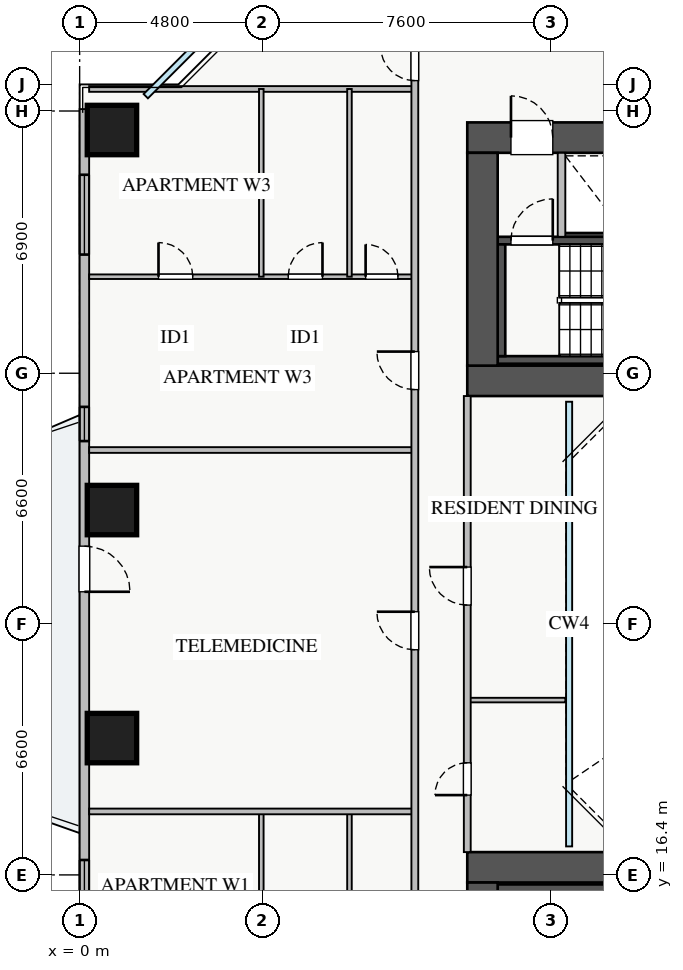
"""IFC4 building model, lengths in metres.
Left out: names, types, materials, properties, quantities, classifications, styles, units other than length and angle.
Written with IfcOpenShell. Run it as: python <this file> out.ifc"""

import sys

from ifc_helpers import new_model, si_unit, direction, frame, frame_2d, origin, origin_2d, place, context, subcontext, project, spatial, rectangle, extrude, source, transform, mapped, element, fill, save


model = new_model("IFC4")
c1 = context("Model", 3, precision=1e-05, world=origin(), true_north=direction((0.0, 1.0)))
c2 = subcontext(c1, "Body", "Model", "MODEL_VIEW")
j1 = project(units=[si_unit("LENGTHUNIT", "METRE"), si_unit("PLANEANGLEUNIT", "RADIAN")], contexts=[c1])
p1 = place(None, origin())
s1 = spatial("IfcSite", under=j1, at=p1, CompositionType="ELEMENT")
p2 = place(p1, origin())
s2 = spatial("IfcBuilding", under=s1, at=p2, CompositionType="ELEMENT")
p3 = place(p2, frame((0.0, 0.0, 56.75)))
s3 = spatial("IfcBuildingStorey", under=s2, at=p3, CompositionType="ELEMENT", Elevation=56.75)
p4 = place(p3, frame((12.68, 33.2, 0.0), z_axis=(0.0, 0.0, 1.0), x_axis=(1.0, 0.0, 0.0)))
e1 = element("IfcWall", 1, at=p4, inside=s3, PredefinedType="SHEAR", context=c2, shape_type="SweptSolid", body=[
    extrude(rectangle(XDim=1.94, YDim=0.18, at=frame_2d((0.97, 0.0))), origin(), (0.0, 0.0, 1.0), 3.07),
])
p5 = place(p3, frame((11.0, 29.95, 0.0), z_axis=(0.0, 0.0, 1.0), x_axis=(1.0, 0.0, 0.0)))
e2 = element("IfcWall", 2, at=p5, inside=s3, PredefinedType="SHEAR", context=c2, shape_type="SweptSolid", body=[
    extrude(rectangle(XDim=7.15, YDim=0.2, at=frame_2d((3.575, 0.0))), origin(), (0.0, 0.0, 1.0), 3.25),
])
p6 = place(p3, frame((11.0, 33.09, 0.0), z_axis=(0.0, 0.0, 1.0), x_axis=(1.0, 0.0, 0.0)))
e3 = element("IfcWall", 3, at=p6, inside=s3, PredefinedType="SHEAR", context=c2, shape_type="SweptSolid", body=[
    extrude(rectangle(XDim=7.15, YDim=0.2, at=frame_2d((3.575, 0.0))), origin(), (0.0, 0.0, 1.0), 3.25),
])
p7 = place(p6, frame((0.35, 0.0, 0.0)))
e4 = element("IfcOpeningElement", 4, at=p7, cuts=e3, PredefinedType="OPENING", context=c2, shape_type="SweptSolid", body=[
    extrude(rectangle(XDim=1.1, YDim=2.05, at=frame_2d((0.55, 1.025))), frame((0.0, 0.11, 0.0), z_axis=(0.0, -1.0, 0.0), x_axis=(1.0, 0.0, 0.0)), (0.0, 0.0, 1.0), 0.22),
])
p8 = place(p3, frame((11.1, 30.05, 0.0), z_axis=(0.0, 0.0, 1.0), x_axis=(0.0, 1.0, 0.0)))
e5 = element("IfcWall", 5, at=p8, inside=s3, PredefinedType="SHEAR", context=c2, shape_type="SweptSolid", body=[
    extrude(rectangle(XDim=2.94, YDim=0.2, at=frame_2d((1.47, 0.0))), origin(), (0.0, 0.0, 1.0), 3.25),
])
p9 = place(p3, frame((11.0, 16.05, 0.0), z_axis=(0.0, 0.0, 1.0), x_axis=(1.0, 0.0, 0.0)))
e6 = element("IfcWall", 6, at=p9, inside=s3, PredefinedType="SHEAR", context=c2, shape_type="SweptSolid", body=[
    extrude(rectangle(XDim=7.15, YDim=0.2, at=frame_2d((3.575, 0.0))), origin(), (0.0, 0.0, 1.0), 3.25),
])
p10 = place(p3, frame((10.2, 29.4, 0.0), z_axis=(0.0, 0.0, 1.0), x_axis=(1.0, 0.0, 0.0)))
e7 = element("IfcWall", 7, at=p10, inside=s3, PredefinedType="SHEAR", context=c2, shape_type="SweptSolid", body=[
    extrude(rectangle(XDim=17.6, YDim=0.8, at=frame_2d((8.8, 0.0))), origin(), (0.0, 0.0, 1.0), 3.25),
])
p11 = place(p3, frame((10.2, 35.8, 0.0), z_axis=(0.0, 0.0, 1.0), x_axis=(1.0, 0.0, 0.0)))
e8 = element("IfcWall", 8, at=p11, inside=s3, PredefinedType="SHEAR", context=c2, shape_type="SweptSolid", body=[
    extrude(rectangle(XDim=17.6, YDim=0.8, at=frame_2d((8.8, 0.0))), origin(), (0.0, 0.0, 1.0), 3.25),
])
p12 = place(p11, frame((1.15, 0.0, 0.0)))
e9 = element("IfcOpeningElement", 9, at=p12, cuts=e8, PredefinedType="OPENING", context=c2, shape_type="SweptSolid", body=[
    extrude(rectangle(XDim=1.1, YDim=2.05, at=frame_2d((0.55, 1.025))), frame((0.0, 0.41, 0.0), z_axis=(0.0, -1.0, 0.0), x_axis=(1.0, 0.0, 0.0)), (0.0, 0.0, 1.0), 0.82),
])
p13 = place(p11, frame((8.3, 0.0, 0.0)))
e10 = element("IfcOpeningElement", 10, at=p13, cuts=e8, PredefinedType="OPENING", context=c2, shape_type="SweptSolid", body=[
    extrude(rectangle(XDim=1.1, YDim=2.05, at=frame_2d((0.55, 1.025))), frame((0.0, 0.41, 0.0), z_axis=(0.0, -1.0, 0.0), x_axis=(1.0, 0.0, 0.0)), (0.0, 0.0, 1.0), 0.82),
])
p14 = place(p11, frame((10.05, 0.0, 0.0)))
e11 = element("IfcOpeningElement", 11, at=p14, cuts=e8, PredefinedType="OPENING", context=c2, shape_type="SweptSolid", body=[
    extrude(rectangle(XDim=1.1, YDim=2.05, at=frame_2d((0.55, 1.025))), frame((0.0, 0.41, 0.0), z_axis=(0.0, -1.0, 0.0), x_axis=(1.0, 0.0, 0.0)), (0.0, 0.0, 1.0), 0.82),
])
p15 = place(p11, frame((14.74, 0.0, 0.0)))
e12 = element("IfcOpeningElement", 12, at=p15, cuts=e8, PredefinedType="OPENING", context=c2, shape_type="SweptSolid", body=[
    extrude(rectangle(XDim=1.0, YDim=2.05, at=frame_2d((0.5, 1.025))), frame((0.0, 0.41, 0.0), z_axis=(0.0, -1.0, 0.0), x_axis=(1.0, 0.0, 0.0)), (0.0, 0.0, 1.0), 0.82),
])
p16 = place(p11, frame((12.585, 0.0, 0.0)))
e13 = element("IfcOpeningElement", 13, at=p16, cuts=e8, PredefinedType="OPENING", context=c2, shape_type="SweptSolid", body=[
    extrude(rectangle(XDim=1.0, YDim=2.05, at=frame_2d((0.5, 1.025))), frame((0.0, 0.41, 0.0), z_axis=(0.0, -1.0, 0.0), x_axis=(1.0, 0.0, 0.0)), (0.0, 0.0, 1.0), 0.82),
])
p17 = place(p3, frame((10.6, 29.8, 0.0), z_axis=(0.0, 0.0, 1.0), x_axis=(0.0, 1.0, 0.0)))
e14 = element("IfcWall", 14, at=p17, inside=s3, PredefinedType="SHEAR", context=c2, shape_type="SweptSolid", body=[
    extrude(rectangle(XDim=5.6, YDim=0.8, at=frame_2d((2.8, 0.0))), origin(), (0.0, 0.0, 1.0), 3.25),
])
p18 = place(p3, frame((10.2, 16.6, 0.0), z_axis=(0.0, 0.0, 1.0), x_axis=(1.0, 0.0, 0.0)))
e15 = element("IfcWall", 15, at=p18, inside=s3, PredefinedType="SHEAR", context=c2, shape_type="SweptSolid", body=[
    extrude(rectangle(XDim=17.6, YDim=0.8, at=frame_2d((8.8, 0.0))), origin(), (0.0, 0.0, 1.0), 3.25),
])
p19 = place(p3, frame((10.6, 10.6, 0.0), z_axis=(0.0, 0.0, 1.0), x_axis=(0.0, 1.0, 0.0)))
e16 = element("IfcWall", 16, at=p19, inside=s3, PredefinedType="SHEAR", context=c2, shape_type="SweptSolid", body=[
    extrude(rectangle(XDim=5.6, YDim=0.8, at=frame_2d((2.8, 0.0))), origin(), (0.0, 0.0, 1.0), 3.25),
])
m1 = source(origin(), c2, "Body", "SweptSolid", [
    extrude(rectangle(XDim=1.3, YDim=1.3, at=origin_2d()), origin(), (0.0, 0.0, 1.0), 3.25),
])
for number, where, z_axis, x_axis in (
    (17, (0.85, 36.0, 0.0), (0.0, 0.0, 1.0), (1.0, 0.0, 0.0)),
    (18, (0.85, 26.0, 0.0), (0.0, 0.0, 1.0), (1.0, 0.0, 0.0)),
    (19, (0.85, 20.0, 0.0), (0.0, 0.0, 1.0), (1.0, 0.0, 0.0)),
):
    element("IfcColumn", number, at=place(p3, frame(where, z_axis=z_axis, x_axis=x_axis)), inside=s3, PredefinedType="COLUMN", context=c2, shape_type="MappedRepresentation", body=[
        mapped(m1, transform((0.0, 0.0, 0.0), x_axis=(1.0, 0.0, 0.0), y_axis=(0.0, 1.0, 0.0), z_axis=(0.0, 0.0, 1.0), scale=1.0)),
    ])
p20 = place(p3, frame((0.125, 9.45, 0.0), z_axis=(0.0, 0.0, 1.0), x_axis=(0.0, 1.0, 0.0)))
e20 = element("IfcWall", 20, at=p20, inside=s3, PredefinedType="STANDARD", context=c2, shape_type="SweptSolid", body=[
    extrude(rectangle(XDim=27.1, YDim=0.25, at=frame_2d((13.55, 0.0))), origin(), (0.0, 0.0, 1.0), 2.61),
])
p21 = place(p20, frame((14.4, 0.0, 0.0)))
e21 = element("IfcOpeningElement", 21, at=p21, cuts=e20, PredefinedType="OPENING", context=c2, shape_type="SweptSolid", body=[
    extrude(rectangle(XDim=1.2, YDim=2.1, at=frame_2d((0.6, 1.05))), frame((0.0, 0.135, 0.0), z_axis=(0.0, -1.0, 0.0), x_axis=(1.0, 0.0, 0.0)), (0.0, 0.0, 1.0), 0.27),
])
p22 = place(p20, frame((1.512, 0.0, 0.9)))
e22 = element("IfcOpeningElement", 22, at=p22, cuts=e20, PredefinedType="OPENING", context=c2, shape_type="SweptSolid", body=[
    extrude(rectangle(XDim=1.8, YDim=1.5, at=frame_2d((0.9, 0.75))), frame((0.0, 0.135, 0.0), z_axis=(0.0, -1.0, 0.0), x_axis=(1.0, 0.0, 0.0)), (0.0, 0.0, 1.0), 0.27),
])
p23 = place(p20, frame((23.272, 0.0, 0.9)))
e23 = element("IfcOpeningElement", 23, at=p23, cuts=e20, PredefinedType="OPENING", context=c2, shape_type="SweptSolid", body=[
    extrude(rectangle(XDim=2.1, YDim=1.5, at=frame_2d((1.05, 0.75))), frame((0.0, 0.135, 0.0), z_axis=(0.0, -1.0, 0.0), x_axis=(1.0, 0.0, 0.0)), (0.0, 0.0, 1.0), 0.27),
])
p24 = place(p20, frame((4.942, 0.0, 0.9)))
e24 = element("IfcOpeningElement", 24, at=p24, cuts=e20, PredefinedType="OPENING", context=c2, shape_type="SweptSolid", body=[
    extrude(rectangle(XDim=2.4, YDim=1.5, at=frame_2d((1.2, 0.75))), frame((0.0, 0.135, 0.0), z_axis=(0.0, -1.0, 0.0), x_axis=(1.0, 0.0, 0.0)), (0.0, 0.0, 1.0), 0.27),
])
p25 = place(p20, frame((18.365, 0.0, 0.9)))
e25 = element("IfcOpeningElement", 25, at=p25, cuts=e20, PredefinedType="OPENING", context=c2, shape_type="SweptSolid", body=[
    extrude(rectangle(XDim=0.9, YDim=1.2, at=frame_2d((0.45, 0.6))), frame((0.0, 0.135, 0.0), z_axis=(0.0, -1.0, 0.0), x_axis=(1.0, 0.0, 0.0)), (0.0, 0.0, 1.0), 0.27),
])
p26 = place(p3, frame((12.68, 33.19, 0.0), z_axis=(0.0, 0.0, 1.0), x_axis=(0.0, 1.0, 0.0)))
e26 = element("IfcWall", 26, at=p26, inside=s3, PredefinedType="PARTITIONING", context=c2, shape_type="SweptSolid", body=[
    extrude(rectangle(XDim=2.21, YDim=0.2, at=frame_2d((1.105, 0.0))), origin(), (0.0, 0.0, 1.0), 3.07),
])
p27 = place(p3, frame((0.25, 37.08, 0.0), z_axis=(0.0, 0.0, 1.0), x_axis=(1.0, 0.0, 0.0)))
e27 = element("IfcWall", 27, at=p27, inside=s3, PredefinedType="PARTITIONING", context=c2, shape_type="SweptSolid", body=[
    extrude(rectangle(XDim=8.57, YDim=0.15, at=frame_2d((4.285, 0.0))), origin(), (0.0, 0.0, 1.0), 3.07),
])
for number, where, z_axis, x_axis in (
    (28, (4.78, 13.13, 0.0), (0.0, 0.0, 1.0), (0.0, 1.0, 0.0)),
    (29, (7.1, 13.13, 0.0), (0.0, 0.0, 1.0), (0.0, 1.0, 0.0)),
):
    element("IfcWall", number, at=place(p3, frame(where, z_axis=z_axis, x_axis=x_axis)), inside=s3, PredefinedType="PLUMBINGWALL", context=c2, shape_type="SweptSolid", body=[
        extrude(rectangle(XDim=4.94, YDim=0.12, at=frame_2d((2.47, 0.0))), origin(), (0.0, 0.0, 1.0), 3.07),
    ])
p28 = place(p3, frame((0.25, 18.07, 0.0), z_axis=(0.0, 0.0, 1.0), x_axis=(1.0, 0.0, 0.0)))
e30 = element("IfcWall", 30, at=p28, inside=s3, PredefinedType="PARTITIONING", context=c2, shape_type="SweptSolid", body=[
    extrude(rectangle(XDim=8.57, YDim=0.15, at=frame_2d((4.285, 0.0))), origin(), (0.0, 0.0, 1.0), 2.715),
])
p29 = place(p3, frame((0.25, 32.14, 0.0), z_axis=(0.0, 0.0, 1.0), x_axis=(1.0, 0.0, 0.0)))
e31 = element("IfcWall", 31, at=p29, inside=s3, PredefinedType="PLUMBINGWALL", context=c2, shape_type="SweptSolid", body=[
    extrude(rectangle(XDim=8.57, YDim=0.12, at=frame_2d((4.285, 0.0))), origin(), (0.0, 0.0, 1.0), 3.07),
])
p30 = place(p29, frame((1.825, 0.0, 0.0)))
e32 = element("IfcOpeningElement", 32, at=p30, cuts=e31, PredefinedType="OPENING", context=c2, shape_type="SweptSolid", body=[
    extrude(rectangle(XDim=0.9, YDim=2.05, at=frame_2d((0.45, 1.025))), frame((0.0, 0.07, 0.0), z_axis=(0.0, -1.0, 0.0), x_axis=(1.0, 0.0, 0.0)), (0.0, 0.0, 1.0), 0.14),
])
p31 = place(p29, frame((5.24, 0.0, 0.0)))
e33 = element("IfcOpeningElement", 33, at=p31, cuts=e31, PredefinedType="OPENING", context=c2, shape_type="SweptSolid", body=[
    extrude(rectangle(XDim=0.9, YDim=2.05, at=frame_2d((0.45, 1.025))), frame((0.0, 0.07, 0.0), z_axis=(0.0, -1.0, 0.0), x_axis=(1.0, 0.0, 0.0)), (0.0, 0.0, 1.0), 0.14),
])
p32 = place(p29, frame((7.275, 0.0, 0.0)))
e34 = element("IfcOpeningElement", 34, at=p32, cuts=e31, PredefinedType="OPENING", context=c2, shape_type="SweptSolid", body=[
    extrude(rectangle(XDim=0.85, YDim=2.05, at=frame_2d((0.425, 1.025))), frame((0.0, 0.07, 0.0), z_axis=(0.0, -1.0, 0.0), x_axis=(1.0, 0.0, 0.0)), (0.0, 0.0, 1.0), 0.14),
])
for number, where, z_axis, x_axis in (
    (35, (4.78, 32.14, 0.0), (0.0, 0.0, 1.0), (0.0, 1.0, 0.0)),
    (36, (7.1, 32.14, 0.0), (0.0, 0.0, 1.0), (0.0, 1.0, 0.0)),
):
    element("IfcWall", number, at=place(p3, frame(where, z_axis=z_axis, x_axis=x_axis)), inside=s3, PredefinedType="PLUMBINGWALL", context=c2, shape_type="SweptSolid", body=[
        extrude(rectangle(XDim=4.94, YDim=0.12, at=frame_2d((2.47, 0.0))), origin(), (0.0, 0.0, 1.0), 3.07),
    ])
p33 = place(p3, frame((0.25, 27.58, 0.0), z_axis=(0.0, 0.0, 1.0), x_axis=(1.0, 0.0, 0.0)))
e37 = element("IfcWall", 37, at=p33, inside=s3, PredefinedType="PARTITIONING", context=c2, shape_type="SweptSolid", body=[
    extrude(rectangle(XDim=8.57, YDim=0.15, at=frame_2d((4.285, 0.0))), origin(), (0.0, 0.0, 1.0), 2.715),
])
p34 = place(p3, frame((8.82, 7.21, 0.0), z_axis=(0.0, 0.0, 1.0), x_axis=(0.0, 1.0, 0.0)))
e38 = element("IfcWall", 38, at=p34, inside=s3, PredefinedType="PARTITIONING", context=c2, shape_type="SweptSolid", body=[
    extrude(rectangle(XDim=31.23, YDim=0.18, at=frame_2d((15.615, 0.0))), origin(), (0.0, 0.0, 1.0), 3.07),
])
p35 = place(p34, frame((30.09, 0.0, 0.0)))
e39 = element("IfcOpeningElement", 39, at=p35, cuts=e38, PredefinedType="OPENING", context=c2, shape_type="SweptSolid", body=[
    extrude(rectangle(XDim=0.9, YDim=2.05, at=frame_2d((0.45, 1.025))), frame((0.0, 0.1, 0.0), z_axis=(0.0, -1.0, 0.0), x_axis=(1.0, 0.0, 0.0)), (0.0, 0.0, 1.0), 0.2),
])
p36 = place(p34, frame((0.24, 0.0, 0.0)))
e40 = element("IfcOpeningElement", 40, at=p36, cuts=e38, PredefinedType="OPENING", context=c2, shape_type="SweptSolid", body=[
    extrude(rectangle(XDim=0.9, YDim=2.05, at=frame_2d((0.45, 1.025))), frame((0.0, 0.1, 0.0), z_axis=(0.0, -1.0, 0.0), x_axis=(1.0, 0.0, 0.0)), (0.0, 0.0, 1.0), 0.2),
])
p37 = place(p34, frame((2.95, 0.0, 0.0)))
e41 = element("IfcOpeningElement", 41, at=p37, cuts=e38, PredefinedType="OPENING", context=c2, shape_type="SweptSolid", body=[
    extrude(rectangle(XDim=1.0, YDim=2.05, at=frame_2d((0.5, 1.025))), frame((0.0, 0.1, 0.0), z_axis=(0.0, -1.0, 0.0), x_axis=(1.0, 0.0, 0.0)), (0.0, 0.0, 1.0), 0.2),
])
p38 = place(p34, frame((15.115, 0.0, 0.0)))
e42 = element("IfcOpeningElement", 42, at=p38, cuts=e38, PredefinedType="OPENING", context=c2, shape_type="SweptSolid", body=[
    extrude(rectangle(XDim=1.0, YDim=2.05, at=frame_2d((0.5, 1.025))), frame((0.0, 0.1, 0.0), z_axis=(0.0, -1.0, 0.0), x_axis=(1.0, 0.0, 0.0)), (0.0, 0.0, 1.0), 0.2),
])
p39 = place(p34, frame((21.96, 0.0, 0.0)))
e43 = element("IfcOpeningElement", 43, at=p39, cuts=e38, PredefinedType="OPENING", context=c2, shape_type="SweptSolid", body=[
    extrude(rectangle(XDim=1.0, YDim=2.05, at=frame_2d((0.5, 1.025))), frame((0.0, 0.1, 0.0), z_axis=(0.0, -1.0, 0.0), x_axis=(1.0, 0.0, 0.0)), (0.0, 0.0, 1.0), 0.2),
])
p40 = place(p3, frame((10.2, 21.0, 0.0), z_axis=(0.0, 0.0, 1.0), x_axis=(1.0, 0.0, 0.0)))
e44 = element("IfcWall", 44, at=p40, inside=s3, PredefinedType="PLUMBINGWALL", context=c2, shape_type="SweptSolid", body=[
    extrude(rectangle(XDim=2.58, YDim=0.12, at=frame_2d((1.29, 0.0))), origin(), (0.0, 0.0, 1.0), 3.07),
])
p41 = place(p3, frame((10.2, 17.0, 0.0), z_axis=(0.0, 0.0, 1.0), x_axis=(0.0, 1.0, 0.0)))
e45 = element("IfcWall", 45, at=p41, inside=s3, PredefinedType="PARTITIONING", context=c2, shape_type="SweptSolid", body=[
    extrude(rectangle(XDim=12.0, YDim=0.18, at=frame_2d((6.0, 0.0))), origin(), (0.0, 0.0, 1.0), 3.07),
])
p42 = place(p41, frame((1.5, 0.0, 0.0)))
e46 = element("IfcOpeningElement", 46, at=p42, cuts=e45, PredefinedType="OPENING", context=c2, shape_type="SweptSolid", body=[
    extrude(rectangle(XDim=0.85, YDim=2.05, at=frame_2d((0.425, 1.025))), frame((0.0, 0.1, 0.0), z_axis=(0.0, -1.0, 0.0), x_axis=(1.0, 0.0, 0.0)), (0.0, 0.0, 1.0), 0.2),
])
p43 = place(p41, frame((6.5, 0.0, 0.0)))
e47 = element("IfcOpeningElement", 47, at=p43, cuts=e45, PredefinedType="OPENING", context=c2, shape_type="SweptSolid", body=[
    extrude(rectangle(XDim=1.0, YDim=2.05, at=frame_2d((0.5, 1.025))), frame((0.0, 0.1, 0.0), z_axis=(0.0, -1.0, 0.0), x_axis=(1.0, 0.0, 0.0)), (0.0, 0.0, 1.0), 0.2),
])
m2 = source(origin(), c2, "Body", "SweptSolid", [
    extrude(rectangle(XDim=1.2, YDim=2.1, at=frame_2d((0.6, 1.05))), frame((0.0, 0.025, 0.0), z_axis=(0.0, -1.0, 0.0), x_axis=(1.0, 0.0, 0.0)), (0.0, 0.0, 1.0), 0.05),
])
p44 = place(p21, frame((1.2, 0.0, 0.0), z_axis=(0.0, 0.0, 1.0), x_axis=(-1.0, 0.0, 0.0)))
e48 = element("IfcDoor", 48, at=p44, inside=s3, OperationType="SINGLE_SWING_LEFT", PredefinedType="DOOR", context=c2, shape_type="MappedRepresentation", body=[
    mapped(m2, transform((0.0, 0.0, 0.0), x_axis=(1.0, 0.0, 0.0), y_axis=(0.0, 1.0, 0.0), z_axis=(0.0, 0.0, 1.0), scale=1.0)),
])
fill(e21, e48)
m3 = source(origin(), c2, "Body", "SweptSolid", [
    extrude(rectangle(XDim=2.1, YDim=1.5, at=frame_2d((1.05, 0.75))), frame((0.0, 0.03, 0.0), z_axis=(0.0, -1.0, 0.0), x_axis=(1.0, 0.0, 0.0)), (0.0, 0.0, 1.0), 0.06),
])
p45 = place(p23, origin())
e49 = element("IfcWindow", 49, at=p45, inside=s3, PartitioningType="TRIPLE_PANEL_VERTICAL", PredefinedType="WINDOW", context=c2, shape_type="MappedRepresentation", body=[
    mapped(m3, transform((0.0, 0.0, 0.0), x_axis=(1.0, 0.0, 0.0), y_axis=(0.0, 1.0, 0.0), z_axis=(0.0, 0.0, 1.0), scale=1.0)),
])
fill(e23, e49)
m4 = source(origin(), c2, "Body", "SweptSolid", [
    extrude(rectangle(XDim=1.1, YDim=2.05, at=frame_2d((0.55, 1.025))), frame((0.0, 0.025, 0.0), z_axis=(0.0, -1.0, 0.0), x_axis=(1.0, 0.0, 0.0)), (0.0, 0.0, 1.0), 0.05),
])
p46 = place(p12, origin())
e50 = element("IfcDoor", 50, at=p46, inside=s3, OperationType="SINGLE_SWING_LEFT", PredefinedType="DOOR", context=c2, shape_type="MappedRepresentation", body=[
    mapped(m4, transform((0.0, 0.0, 0.0), x_axis=(1.0, 0.0, 0.0), y_axis=(0.0, 1.0, 0.0), z_axis=(0.0, 0.0, 1.0), scale=1.0)),
])
fill(e9, e50)
p47 = place(p7, origin())
e51 = element("IfcDoor", 51, at=p47, inside=s3, OperationType="SINGLE_SWING_RIGHT", PredefinedType="DOOR", context=c2, shape_type="MappedRepresentation", body=[
    mapped(m4, transform((0.0, 0.0, 0.0), x_axis=(1.0, 0.0, 0.0), y_axis=(0.0, 1.0, 0.0), z_axis=(0.0, 0.0, 1.0), scale=1.0)),
])
fill(e4, e51)
m5 = source(origin(), c2, "Body", "SweptSolid", [
    extrude(rectangle(XDim=0.9, YDim=2.05, at=frame_2d((0.45, 1.025))), frame((0.0, 0.025, 0.0), z_axis=(0.0, -1.0, 0.0), x_axis=(1.0, 0.0, 0.0)), (0.0, 0.0, 1.0), 0.05),
])
p48 = place(p30, origin())
e52 = element("IfcDoor", 52, at=p48, inside=s3, OperationType="SINGLE_SWING_LEFT", PredefinedType="DOOR", context=c2, shape_type="MappedRepresentation", body=[
    mapped(m5, transform((0.0, 0.0, 0.0), x_axis=(1.0, 0.0, 0.0), y_axis=(0.0, 1.0, 0.0), z_axis=(0.0, 0.0, 1.0), scale=1.0)),
])
fill(e32, e52)
p49 = place(p31, origin())
e53 = element("IfcDoor", 53, at=p49, inside=s3, OperationType="SINGLE_SWING_RIGHT", PredefinedType="DOOR", context=c2, shape_type="MappedRepresentation", body=[
    mapped(m5, transform((0.0, 0.0, 0.0), x_axis=(1.0, 0.0, 0.0), y_axis=(0.0, 1.0, 0.0), z_axis=(0.0, 0.0, 1.0), scale=1.0)),
])
fill(e33, e53)
m6 = source(origin(), c2, "Body", "SweptSolid", [
    extrude(rectangle(XDim=0.85, YDim=2.05, at=frame_2d((0.425, 1.025))), frame((0.0, 0.025, 0.0), z_axis=(0.0, -1.0, 0.0), x_axis=(1.0, 0.0, 0.0)), (0.0, 0.0, 1.0), 0.05),
])
p50 = place(p32, origin())
e54 = element("IfcDoor", 54, at=p50, inside=s3, OperationType="SINGLE_SWING_LEFT", PredefinedType="DOOR", context=c2, shape_type="MappedRepresentation", body=[
    mapped(m6, transform((0.0, 0.0, 0.0), x_axis=(1.0, 0.0, 0.0), y_axis=(0.0, 1.0, 0.0), z_axis=(0.0, 0.0, 1.0), scale=1.0)),
])
fill(e34, e54)
p51 = place(p35, origin())
e55 = element("IfcDoor", 55, at=p51, inside=s3, OperationType="SINGLE_SWING_RIGHT", PredefinedType="DOOR", context=c2, shape_type="MappedRepresentation", body=[
    mapped(m5, transform((0.0, 0.0, 0.0), x_axis=(1.0, 0.0, 0.0), y_axis=(0.0, 1.0, 0.0), z_axis=(0.0, 0.0, 1.0), scale=1.0)),
])
fill(e39, e55)
m7 = source(origin(), c2, "Body", "SweptSolid", [
    extrude(rectangle(XDim=1.0, YDim=2.05, at=frame_2d((0.5, 1.025))), frame((0.0, 0.025, 0.0), z_axis=(0.0, -1.0, 0.0), x_axis=(1.0, 0.0, 0.0)), (0.0, 0.0, 1.0), 0.05),
])
p52 = place(p38, origin())
e56 = element("IfcDoor", 56, at=p52, inside=s3, OperationType="SINGLE_SWING_RIGHT", PredefinedType="DOOR", context=c2, shape_type="MappedRepresentation", body=[
    mapped(m7, transform((0.0, 0.0, 0.0), x_axis=(1.0, 0.0, 0.0), y_axis=(0.0, 1.0, 0.0), z_axis=(0.0, 0.0, 1.0), scale=1.0)),
])
fill(e42, e56)
p53 = place(p39, origin())
e57 = element("IfcDoor", 57, at=p53, inside=s3, OperationType="SINGLE_SWING_RIGHT", PredefinedType="DOOR", context=c2, shape_type="MappedRepresentation", body=[
    mapped(m7, transform((0.0, 0.0, 0.0), x_axis=(1.0, 0.0, 0.0), y_axis=(0.0, 1.0, 0.0), z_axis=(0.0, 0.0, 1.0), scale=1.0)),
])
fill(e43, e57)
p54 = place(p42, origin())
e58 = element("IfcDoor", 58, at=p54, inside=s3, OperationType="SINGLE_SWING_LEFT", PredefinedType="DOOR", context=c2, shape_type="MappedRepresentation", body=[
    mapped(m6, transform((0.0, 0.0, 0.0), x_axis=(1.0, 0.0, 0.0), y_axis=(0.0, 1.0, 0.0), z_axis=(0.0, 0.0, 1.0), scale=1.0)),
])
fill(e46, e58)
p55 = place(p43, origin())
e59 = element("IfcDoor", 59, at=p55, inside=s3, OperationType="SINGLE_SWING_RIGHT", PredefinedType="DOOR", context=c2, shape_type="MappedRepresentation", body=[
    mapped(m7, transform((0.0, 0.0, 0.0), x_axis=(1.0, 0.0, 0.0), y_axis=(0.0, 1.0, 0.0), z_axis=(0.0, 0.0, 1.0), scale=1.0)),
])
fill(e47, e59)
m8 = source(origin(), c2, "Body", "SweptSolid", [
    extrude(rectangle(XDim=2.4, YDim=1.5, at=frame_2d((1.2, 0.75))), frame((0.0, 0.03, 0.0), z_axis=(0.0, -1.0, 0.0), x_axis=(1.0, 0.0, 0.0)), (0.0, 0.0, 1.0), 0.06),
])
p56 = place(p24, origin())
e60 = element("IfcWindow", 60, at=p56, inside=s3, PartitioningType="TRIPLE_PANEL_VERTICAL", PredefinedType="WINDOW", context=c2, shape_type="MappedRepresentation", body=[
    mapped(m8, transform((0.0, 0.0, 0.0), x_axis=(1.0, 0.0, 0.0), y_axis=(0.0, 1.0, 0.0), z_axis=(0.0, 0.0, 1.0), scale=1.0)),
])
fill(e24, e60)
m9 = source(origin(), c2, "Body", "SweptSolid", [
    extrude(rectangle(XDim=0.9, YDim=1.2, at=frame_2d((0.45, 0.6))), frame((0.0, 0.03, 0.0), z_axis=(0.0, -1.0, 0.0), x_axis=(1.0, 0.0, 0.0)), (0.0, 0.0, 1.0), 0.06),
])
p57 = place(p25, origin())
e61 = element("IfcWindow", 61, at=p57, inside=s3, PartitioningType="SINGLE_PANEL", PredefinedType="WINDOW", context=c2, shape_type="MappedRepresentation", body=[
    mapped(m9, transform((0.0, 0.0, 0.0), x_axis=(1.0, 0.0, 0.0), y_axis=(0.0, 1.0, 0.0), z_axis=(0.0, 0.0, 1.0), scale=1.0)),
])
fill(e25, e61)
save(model, sys.argv[1])
